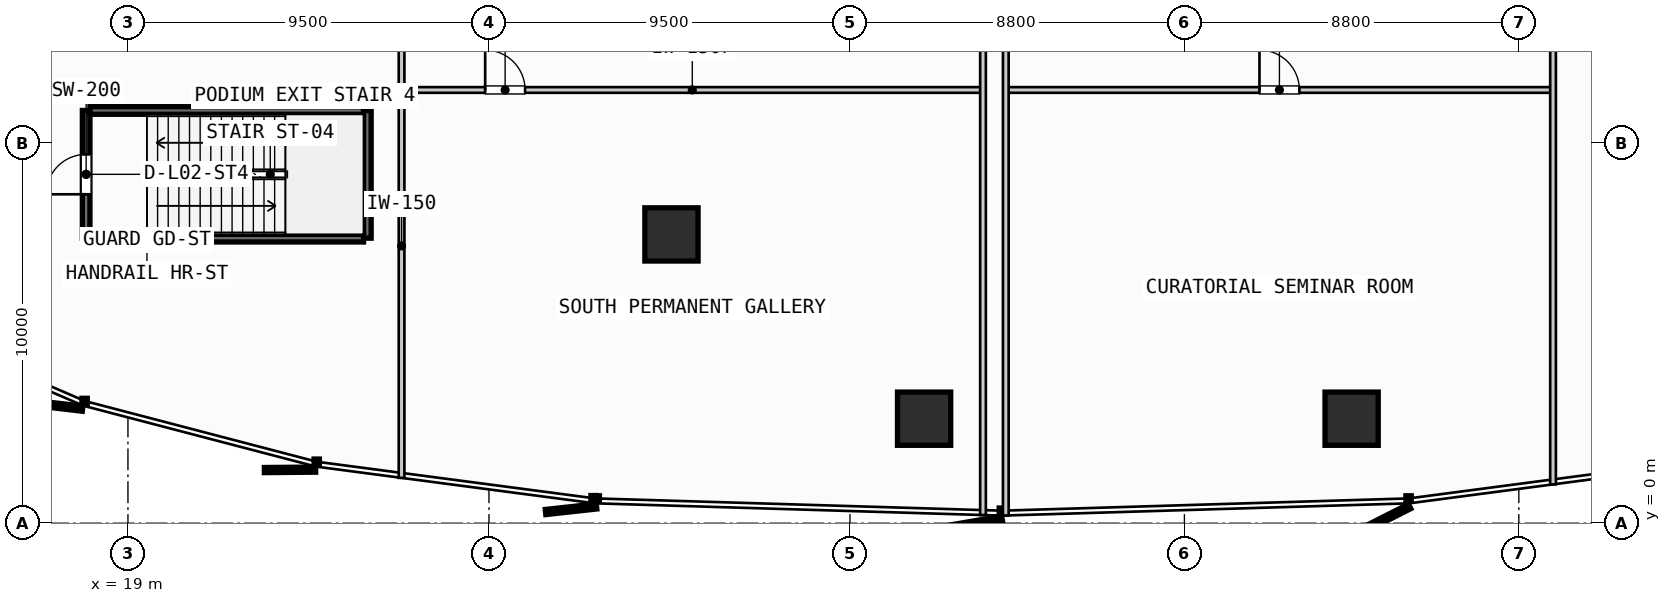
"""IFC4 building model, lengths in metres.
Left out: names, types, materials, properties, quantities, classifications, styles, units other than length and angle.
Written with IfcOpenShell. Run it as: python <this file> out.ifc"""

import sys

from ifc_helpers import new_model, si_unit, direction, frame, frame_2d, origin, origin_2d, place, context, subcontext, project, spatial, rectangle, hollow_rectangle, extrude, source, transform, mapped, element, fill, save


model = new_model("IFC4")
c1 = context("Model", 3, precision=1e-05, world=origin(), true_north=direction((0.0, 1.0)))
c2 = subcontext(c1, "Body", "Model", "MODEL_VIEW")
j1 = project(units=[si_unit("LENGTHUNIT", "METRE"), si_unit("PLANEANGLEUNIT", "RADIAN")], contexts=[c1])
p1 = place(None, origin())
s1 = spatial("IfcSite", under=j1, at=p1, CompositionType="ELEMENT")
p2 = place(p1, origin())
s2 = spatial("IfcBuilding", under=s1, at=p2, CompositionType="ELEMENT")
p3 = place(p2, frame((0.0, 0.0, 10.0)))
s3 = spatial("IfcBuildingStorey", under=s2, at=p3, CompositionType="ELEMENT", Elevation=10.0)
m1 = source(origin(), c2, "Body", "SweptSolid", [
    extrude(hollow_rectangle(XDim=1.4, YDim=1.4, WallThickness=0.05, InnerFilletRadius=0.025, OuterFilletRadius=0.075, at=origin_2d()), origin(), (0.0, 0.0, 1.0), 4.53),
])
for number, where, z_axis, x_axis in (
    (1, (33.302, 7.599, 0.0), (0.0, 0.0, 1.0), (1.0, 0.0, 0.0)),
    (2, (39.95, 2.75, 0.0), (0.0, 0.0, 1.0), (1.0, 0.0, 0.0)),
    (3, (51.2, 2.75, 0.0), (0.0, 0.0, 1.0), (1.0, 0.0, 0.0)),
):
    element("IfcColumn", number, at=place(p3, frame(where, z_axis=z_axis, x_axis=x_axis)), inside=s3, PredefinedType="COLUMN", context=c2, shape_type="MappedRepresentation", body=[
        mapped(m1, transform((0.0, 0.0, 0.0), scale=1.0)),
    ])
p4 = place(p3, frame((17.9, 7.5, 0.0), z_axis=(0.0, 0.0, 1.0), x_axis=(0.0, 1.0, 0.0)))
e4 = element("IfcWall", 4, at=p4, inside=s3, PredefinedType="SHEAR", context=c2, shape_type="SweptSolid", body=[
    extrude(rectangle(XDim=3.36, YDim=0.2, at=frame_2d((1.68, 0.0))), origin(), (0.0, 0.0, 1.0), 4.53),
])
p5 = place(p4, frame((1.155, 0.0, 0.0)))
e5 = element("IfcOpeningElement", 5, at=p5, cuts=e4, PredefinedType="OPENING", context=c2, shape_type="SweptSolid", body=[
    extrude(rectangle(XDim=1.05, YDim=2.15, at=frame_2d((0.525, 1.075))), frame((0.0, 0.11, 0.0), z_axis=(0.0, -1.0, 0.0), x_axis=(1.0, 0.0, 0.0)), (0.0, 0.0, 1.0), 0.22),
])
p6 = place(p3, frame((25.3, 10.86, 0.0), z_axis=(0.0, 0.0, 1.0), x_axis=(0.0, -1.0, 0.0)))
e6 = element("IfcWall", 6, at=p6, inside=s3, PredefinedType="SHEAR", context=c2, shape_type="SweptSolid", body=[
    extrude(rectangle(XDim=3.36, YDim=0.2, at=frame_2d((1.68, 0.0))), origin(), (0.0, 0.0, 1.0), 4.53),
])
for number, where, z_axis, x_axis in (
    (7, (25.2, 7.5, 0.0), (0.0, 0.0, 1.0), (-1.0, 0.0, 0.0)),
    (8, (18.0, 10.86, 0.0), (0.0, 0.0, 1.0), (1.0, 0.0, 0.0)),
):
    element("IfcWall", number, at=place(p3, frame(where, z_axis=z_axis, x_axis=x_axis)), inside=s3, PredefinedType="SHEAR", context=c2, shape_type="SweptSolid", body=[
        extrude(rectangle(XDim=7.2, YDim=0.2, at=frame_2d((3.6, 0.0))), origin(), (0.0, 0.0, 1.0), 4.53),
    ])
p7 = place(p3, frame((26.2, 11.4, 0.0), z_axis=(0.0, 0.0, 1.0), x_axis=(1.0, 0.0, 0.0)))
e9 = element("IfcWall", 9, at=p7, inside=s3, PredefinedType="PARTITIONING", context=c2, shape_type="SweptSolid", body=[
    extrude(rectangle(XDim=15.3, YDim=0.15, at=frame_2d((7.65, 0.0))), origin(), (0.0, 0.0, 1.0), 3.743),
])
p8 = place(p7, frame((2.2, 0.0, 0.0)))
e10 = element("IfcOpeningElement", 10, at=p8, cuts=e9, PredefinedType="OPENING", context=c2, shape_type="SweptSolid", body=[
    extrude(rectangle(XDim=1.05, YDim=2.15, at=frame_2d((0.525, 1.075))), frame((0.0, 0.085, 0.0), z_axis=(0.0, -1.0, 0.0), x_axis=(1.0, 0.0, 0.0)), (0.0, 0.0, 1.0), 0.17),
])
p9 = place(p3, frame((26.2, 1.193, 0.0), z_axis=(0.0, 0.0, 1.0), x_axis=(0.0, 1.0, 0.0)))
e11 = element("IfcWall", 11, at=p9, inside=s3, PredefinedType="PARTITIONING", context=c2, shape_type="SweptSolid", body=[
    extrude(rectangle(XDim=12.207, YDim=0.15, at=frame_2d((6.104, 0.0))), origin(), (0.0, 0.0, 1.0), 3.743),
])
p10 = place(p3, frame((41.5, 0.215, 0.0), z_axis=(0.0, 0.0, 1.0), x_axis=(0.0, 1.0, 0.0)))
e12 = element("IfcWall", 12, at=p10, inside=s3, PredefinedType="PARTITIONING", context=c2, shape_type="SweptSolid", body=[
    extrude(rectangle(XDim=13.185, YDim=0.15, at=frame_2d((6.592, 0.0))), origin(), (0.0, 0.0, 1.0), 3.743),
])
p11 = place(p3, frame((42.1, 11.4, 0.0), z_axis=(0.0, 0.0, 1.0), x_axis=(1.0, 0.0, 0.0)))
e13 = element("IfcWall", 13, at=p11, inside=s3, PredefinedType="PARTITIONING", context=c2, shape_type="SweptSolid", body=[
    extrude(rectangle(XDim=14.4, YDim=0.15, at=frame_2d((7.2, 0.0))), origin(), (0.0, 0.0, 1.0), 3.743),
])
p12 = place(p11, frame((6.675, 0.0, 0.0)))
e14 = element("IfcOpeningElement", 14, at=p12, cuts=e13, PredefinedType="OPENING", context=c2, shape_type="SweptSolid", body=[
    extrude(rectangle(XDim=1.05, YDim=2.15, at=frame_2d((0.525, 1.075))), frame((0.0, 0.085, 0.0), z_axis=(0.0, -1.0, 0.0), x_axis=(1.0, 0.0, 0.0)), (0.0, 0.0, 1.0), 0.17),
])
p13 = place(p3, frame((42.1, 0.203, 0.0), z_axis=(0.0, 0.0, 1.0), x_axis=(0.0, 1.0, 0.0)))
e15 = element("IfcWall", 15, at=p13, inside=s3, PredefinedType="PARTITIONING", context=c2, shape_type="SweptSolid", body=[
    extrude(rectangle(XDim=13.197, YDim=0.15, at=frame_2d((6.599, 0.0))), origin(), (0.0, 0.0, 1.0), 3.743),
])
p14 = place(p3, frame((56.5, 1.022, 0.0), z_axis=(0.0, 0.0, 1.0), x_axis=(0.0, 1.0, 0.0)))
e16 = element("IfcWall", 16, at=p14, inside=s3, PredefinedType="PARTITIONING", context=c2, shape_type="SweptSolid", body=[
    extrude(rectangle(XDim=12.378, YDim=0.15, at=frame_2d((6.189, 0.0))), origin(), (0.0, 0.0, 1.0), 3.743),
])
m2 = source(origin(), c2, "Body", "SweptSolid", [
    extrude(rectangle(XDim=1.05, YDim=2.15, at=frame_2d((0.525, 1.075))), frame((0.0, 0.025, 0.0), z_axis=(0.0, -1.0, 0.0), x_axis=(1.0, 0.0, 0.0)), (0.0, 0.0, 1.0), 0.05),
])
p15 = place(p5, origin())
e17 = element("IfcDoor", 17, at=p15, inside=s3, OperationType="SINGLE_SWING_LEFT", PredefinedType="DOOR", context=c2, shape_type="MappedRepresentation", body=[
    mapped(m2, transform((0.0, 0.0, 0.0), scale=1.0)),
])
fill(e5, e17)
p16 = place(p8, origin())
e18 = element("IfcDoor", 18, at=p16, inside=s3, OperationType="SINGLE_SWING_LEFT", PredefinedType="DOOR", context=c2, shape_type="MappedRepresentation", body=[
    mapped(m2, transform((0.0, 0.0, 0.0), scale=1.0)),
])
fill(e10, e18)
p17 = place(p12, origin())
e19 = element("IfcDoor", 19, at=p17, inside=s3, OperationType="SINGLE_SWING_LEFT", PredefinedType="DOOR", context=c2, shape_type="MappedRepresentation", body=[
    mapped(m2, transform((0.0, 0.0, 0.0), scale=1.0)),
])
fill(e14, e19)
save(model, sys.argv[1])
